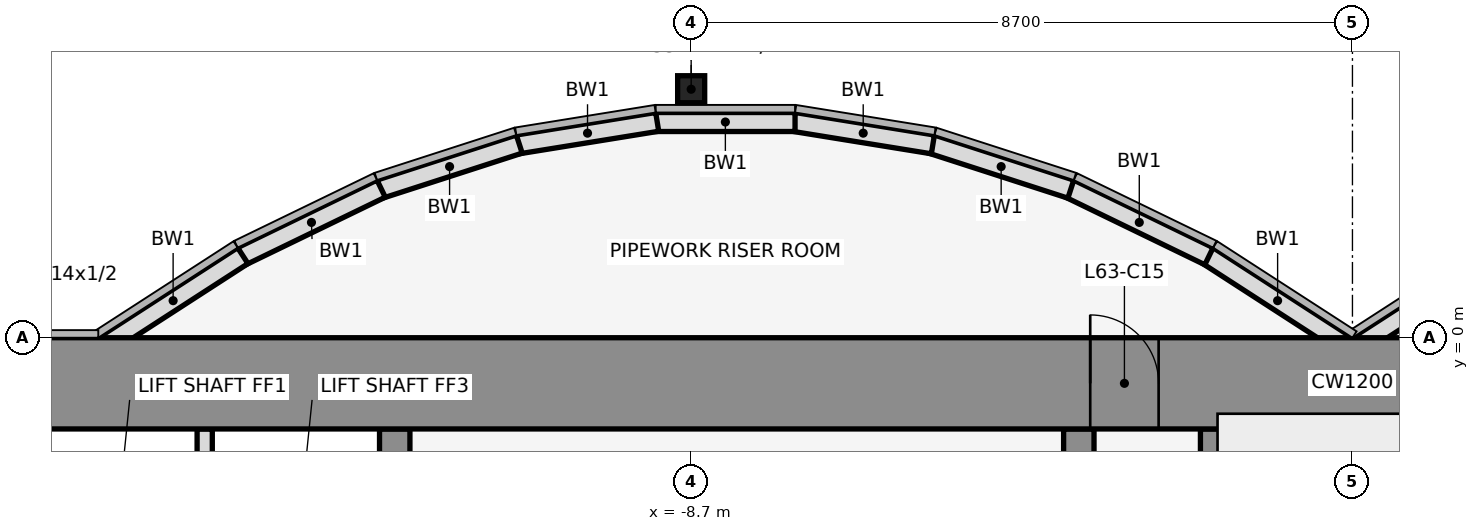
"""IFC4 building model, lengths in metres.
Left out: names, types, materials, properties, quantities, classifications, styles, units other than length and angle.
Written with IfcOpenShell. Run it as: python <this file> out.ifc"""

import sys

from ifc_helpers import new_model, si_unit, direction, frame, frame_2d, origin, origin_2d, place, context, subcontext, project, spatial, rectangle, hollow_rectangle, extrude, element, fill, save


model = new_model("IFC4")
c1 = context("Model", 3, precision=1e-05, world=origin(), true_north=direction((0.0, 1.0)))
c2 = subcontext(c1, "Body", "Model", "MODEL_VIEW")
j1 = project(units=[si_unit("LENGTHUNIT", "METRE"), si_unit("PLANEANGLEUNIT", "RADIAN")], contexts=[c1])
p1 = place(None, origin())
s1 = spatial("IfcSite", under=j1, at=p1, CompositionType="ELEMENT")
p2 = place(p1, origin())
s2 = spatial("IfcBuilding", under=s1, at=p2, CompositionType="ELEMENT")
p3 = place(p2, frame((0.0, 0.0, 279.2)))
s3 = spatial("IfcBuildingStorey", under=s2, at=p3, CompositionType="ELEMENT", Elevation=279.2)
p4 = place(p3, frame((-8.7, 3.269, 0.0), z_axis=(0.0, 0.0, 1.0), x_axis=(1.0, 0.0, 0.0)))
e1 = element("IfcColumn", 1, at=p4, inside=s3, PredefinedType="COLUMN", context=c2, shape_type="SweptSolid", body=[
    extrude(hollow_rectangle(XDim=0.356, YDim=0.356, WallThickness=0.012, at=origin_2d()), origin(), (0.0, 0.0, 1.0), 4.2),
])
for number, where, z_axis, x_axis in (
    (2, (1.901, 1.08, 0.0), (0.0, 0.0, 1.0), (-0.84, -0.543, 0.0)),
    (3, (-0.068, -0.105, 0.0), (0.0, 0.0, 1.0), (-0.84, 0.543, 0.0)),
):
    element("IfcWall", number, at=place(p3, frame(where, z_axis=z_axis, x_axis=x_axis)), inside=s3, PredefinedType="STANDARD", context=c2, shape_type="SweptSolid", body=[
        extrude(rectangle(XDim=2.183, YDim=0.25, at=frame_2d((1.091, 0.0))), origin(), (0.0, 0.0, 1.0), 4.05),
    ])
p5 = place(p3, frame((-1.888, 1.073, 0.0), z_axis=(0.0, 0.0, 1.0), x_axis=(-0.89982408427, 0.436252928206, 0.0)))
e4 = element("IfcWall", 4, at=p5, inside=s3, PredefinedType="STANDARD", context=c2, shape_type="SweptSolid", body=[
    extrude(rectangle(XDim=2.038, YDim=0.25, at=frame_2d((1.019, 0.0))), origin(), (0.0, 0.0, 1.0), 4.05),
])
p6 = place(p3, frame((-3.705, 1.955, 0.0), z_axis=(0.0, 0.0, 1.0), x_axis=(-0.951495806175, 0.307661714928, 0.0)))
e5 = element("IfcWall", 5, at=p6, inside=s3, PredefinedType="STANDARD", context=c2, shape_type="SweptSolid", body=[
    extrude(rectangle(XDim=1.927, YDim=0.25, at=frame_2d((0.963, 0.0))), origin(), (0.0, 0.0, 1.0), 4.05),
])
p7 = place(p3, frame((-5.52, 2.543, 0.0), z_axis=(0.0, 0.0, 1.0), x_axis=(-0.987181718931, 0.159600293885, 0.0)))
e6 = element("IfcWall", 6, at=p7, inside=s3, PredefinedType="STANDARD", context=c2, shape_type="SweptSolid", body=[
    extrude(rectangle(XDim=1.857, YDim=0.25, at=frame_2d((0.929, 0.0))), origin(), (0.0, 0.0, 1.0), 4.05),
])
p8 = place(p3, frame((-7.333, 2.838, 0.0), z_axis=(0.0, 0.0, 1.0), x_axis=(-1.0, 0.0, 0.0)))
e7 = element("IfcWall", 7, at=p8, inside=s3, PredefinedType="STANDARD", context=c2, shape_type="SweptSolid", body=[
    extrude(rectangle(XDim=1.833, YDim=0.25, at=frame_2d((0.917, 0.0))), origin(), (0.0, 0.0, 1.0), 4.05),
])
p9 = place(p3, frame((-9.147, 2.84, 0.0), z_axis=(0.0, 0.0, 1.0), x_axis=(-0.987181718931, -0.159600293885, 0.0)))
e8 = element("IfcWall", 8, at=p9, inside=s3, PredefinedType="STANDARD", context=c2, shape_type="SweptSolid", body=[
    extrude(rectangle(XDim=1.857, YDim=0.25, at=frame_2d((0.929, 0.0))), origin(), (0.0, 0.0, 1.0), 4.05),
])
p10 = place(p3, frame((-10.962, 2.548, 0.0), z_axis=(0.0, 0.0, 1.0), x_axis=(-0.951495806175, -0.307661714928, 0.0)))
e9 = element("IfcWall", 9, at=p10, inside=s3, PredefinedType="STANDARD", context=c2, shape_type="SweptSolid", body=[
    extrude(rectangle(XDim=1.927, YDim=0.25, at=frame_2d((0.963, 0.0))), origin(), (0.0, 0.0, 1.0), 4.05),
])
p11 = place(p3, frame((-12.779, 1.962, 0.0), z_axis=(0.0, 0.0, 1.0), x_axis=(-0.89982408427, -0.436252928206, 0.0)))
e10 = element("IfcWall", 10, at=p11, inside=s3, PredefinedType="STANDARD", context=c2, shape_type="SweptSolid", body=[
    extrude(rectangle(XDim=2.038, YDim=0.25, at=frame_2d((1.019, 0.0))), origin(), (0.0, 0.0, 1.0), 4.05),
])
p12 = place(p3, frame((-14.599, 1.08, 0.0), z_axis=(0.0, 0.0, 1.0), x_axis=(-0.83981312244, -0.542875602121, 0.0)))
e11 = element("IfcWall", 11, at=p12, inside=s3, PredefinedType="STANDARD", context=c2, shape_type="SweptSolid", body=[
    extrude(rectangle(XDim=2.183, YDim=0.25, at=frame_2d((1.091, 0.0))), origin(), (0.0, 0.0, 1.0), 4.05),
])
p13 = place(p3, frame((-15.1, -4.6, 0.0), z_axis=(0.0, 0.0, 1.0), x_axis=(0.0, 1.0, 0.0)))
e12 = element("IfcWall", 12, at=p13, inside=s3, PredefinedType="PARTITIONING", context=c2, shape_type="SweptSolid", body=[
    extrude(rectangle(XDim=3.4, YDim=0.2, at=frame_2d((1.7, 0.0))), origin(), (0.0, 0.0, 1.0), 3.04),
])
p14 = place(p3, frame((-12.6, -11.8, 0.0), z_axis=(0.0, 0.0, 1.0), x_axis=(0.0, 1.0, 0.0)))
e13 = element("IfcWall", 13, at=p14, inside=s3, PredefinedType="SHEAR", context=c2, shape_type="SweptSolid", body=[
    extrude(rectangle(XDim=10.6, YDim=0.4, at=frame_2d((5.3, 0.0))), origin(), (0.0, 0.0, 1.0), 4.2),
])
p15 = place(p14, frame((4.75, 0.0, 0.0)))
e14 = element("IfcOpeningElement", 14, at=p15, cuts=e13, PredefinedType="OPENING", context=c2, shape_type="SweptSolid", body=[
    extrude(rectangle(XDim=1.1, YDim=2.1, at=frame_2d((0.55, 1.05))), frame((0.0, 0.212, 0.0), z_axis=(0.0, -1.0, 0.0), x_axis=(1.0, 0.0, 0.0)), (0.0, 0.0, 1.0), 0.424),
])
p16 = place(p3, frame((-3.6, -11.8, 0.0), z_axis=(0.0, 0.0, 1.0), x_axis=(0.0, 1.0, 0.0)))
e15 = element("IfcWall", 15, at=p16, inside=s3, PredefinedType="SHEAR", context=c2, shape_type="SweptSolid", body=[
    extrude(rectangle(XDim=10.6, YDim=0.4, at=frame_2d((5.3, 0.0))), origin(), (0.0, 0.0, 1.0), 4.2),
])
p17 = place(p16, frame((4.85, 0.0, 0.0)))
e16 = element("IfcOpeningElement", 16, at=p17, cuts=e15, PredefinedType="OPENING", context=c2, shape_type="SweptSolid", body=[
    extrude(rectangle(XDim=0.9, YDim=2.1, at=frame_2d((0.45, 1.05))), frame((0.0, 0.212, 0.0), z_axis=(0.0, -1.0, 0.0), x_axis=(1.0, 0.0, 0.0)), (0.0, 0.0, 1.0), 0.424),
])
p18 = place(p3, frame((-1.8, -11.8, 0.0), z_axis=(0.0, 0.0, 1.0), x_axis=(0.0, 1.0, 0.0)))
e17 = element("IfcWall", 17, at=p18, inside=s3, PredefinedType="SHEAR", context=c2, shape_type="SweptSolid", body=[
    extrude(rectangle(XDim=10.6, YDim=0.4, at=frame_2d((5.3, 0.0))), origin(), (0.0, 0.0, 1.0), 4.2),
])
p19 = place(p3, frame((-22.0, -0.6, 0.0), z_axis=(0.0, 0.0, 1.0), x_axis=(1.0, 0.0, 0.0)))
e18 = element("IfcWall", 18, at=p19, inside=s3, PredefinedType="SHEAR", context=c2, shape_type="SweptSolid", body=[
    extrude(rectangle(XDim=44.0, YDim=1.2, at=frame_2d((22.0, 0.0))), origin(), (0.0, 0.0, 1.0), 4.2),
])
p20 = place(p19, frame((18.55, 0.0, 0.0)))
e19 = element("IfcOpeningElement", 19, at=p20, cuts=e18, PredefinedType="OPENING", context=c2, shape_type="SweptSolid", body=[
    extrude(rectangle(XDim=0.9, YDim=2.1, at=frame_2d((0.45, 1.05))), frame((0.0, 0.612, 0.0), z_axis=(0.0, -1.0, 0.0), x_axis=(1.0, 0.0, 0.0)), (0.0, 0.0, 1.0), 1.224),
])
p21 = place(p19, frame((24.55, 0.0, 0.0)))
e20 = element("IfcOpeningElement", 20, at=p21, cuts=e18, PredefinedType="OPENING", context=c2, shape_type="SweptSolid", body=[
    extrude(rectangle(XDim=0.9, YDim=2.1, at=frame_2d((0.45, 1.05))), frame((0.0, 0.612, 0.0), z_axis=(0.0, -1.0, 0.0), x_axis=(1.0, 0.0, 0.0)), (0.0, 0.0, 1.0), 1.224),
])
p22 = place(p20, origin())
e21 = element("IfcDoor", 21, at=p22, inside=s3, OperationType="SINGLE_SWING_LEFT", PredefinedType="DOOR", context=c2, shape_type="SweptSolid", body=[
    extrude(rectangle(XDim=0.9, YDim=2.1, at=frame_2d((0.45, 1.05))), frame((0.0, 0.025, 0.0), z_axis=(0.0, -1.0, 0.0), x_axis=(1.0, 0.0, 0.0)), (0.0, 0.0, 1.0), 0.05),
])
fill(e19, e21)
save(model, sys.argv[1])
